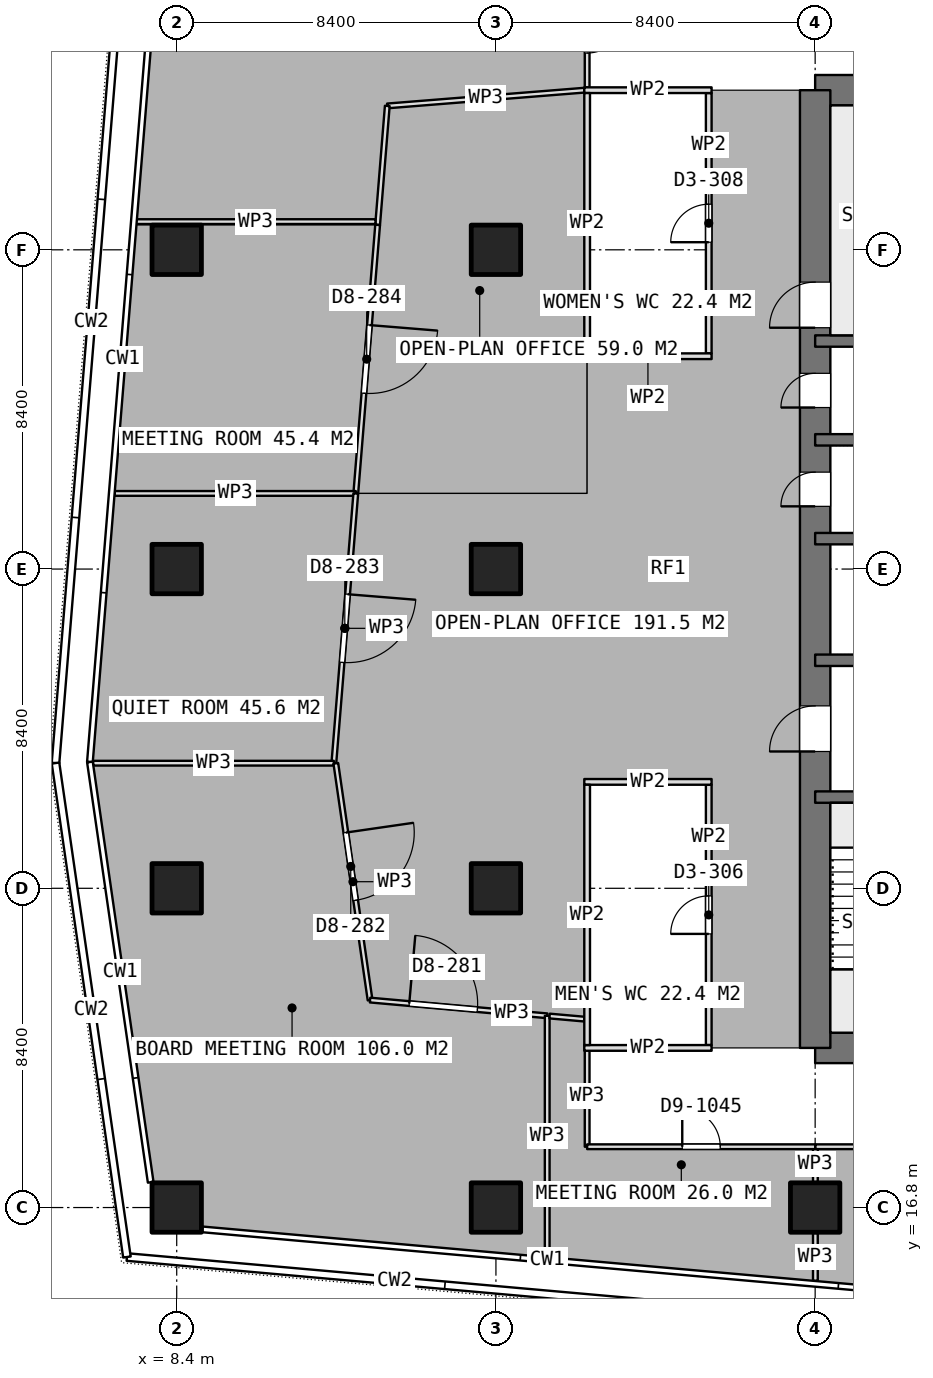
"""IFC4 building model, lengths in metres.
Left out: names, types, materials, properties, quantities, classifications, styles, units other than length and angle.
Written with IfcOpenShell. Run it as: python <this file> out.ifc"""

import sys

from ifc_helpers import new_model, si_unit, direction, frame, frame_2d, origin, origin_2d, place, context, subcontext, project, spatial, rectangle, extrude, element, fill, save


model = new_model("IFC4")
c1 = context("Model", 3, precision=1e-05, world=origin(), true_north=direction((0.0, 1.0)))
c2 = subcontext(c1, "Body", "Model", "MODEL_VIEW")
j1 = project(units=[si_unit("LENGTHUNIT", "METRE"), si_unit("PLANEANGLEUNIT", "RADIAN")], contexts=[c1])
p1 = place(None, origin())
s1 = spatial("IfcSite", under=j1, at=p1, CompositionType="ELEMENT")
p2 = place(p1, origin())
s2 = spatial("IfcBuilding", under=s1, at=p2, CompositionType="ELEMENT")
p3 = place(p2, frame((0.0, 0.0, 283.85)))
s3 = spatial("IfcBuildingStorey", under=s2, at=p3, CompositionType="ELEMENT", Elevation=283.85)
for number, where, z_axis, x_axis in (
    (1, (25.2, 21.0, 0.0), (0.0, 0.0, 1.0), (1.0, 0.0, 0.0)),
    (2, (25.2, 46.2, 0.0), (0.0, 0.0, 1.0), (1.0, 0.0, 0.0)),
):
    element("IfcWall", number, at=place(p3, frame(where, z_axis=z_axis, x_axis=x_axis)), inside=s3, PredefinedType="SHEAR", context=c2, shape_type="SweptSolid", body=[
        extrude(rectangle(XDim=10.4, YDim=0.8, at=frame_2d((5.2, 0.0))), origin(), (0.0, 0.0, 1.0), 3.75),
    ])
p4 = place(p3, frame((25.2, 21.0, 0.0), z_axis=(0.0, 0.0, 1.0), x_axis=(0.0, 1.0, 0.0)))
e3 = element("IfcWall", 3, at=p4, inside=s3, PredefinedType="SHEAR", context=c2, shape_type="SweptSolid", body=[
    extrude(rectangle(XDim=25.2, YDim=0.8, at=frame_2d((12.6, 0.0))), origin(), (0.0, 0.0, 1.0), 3.75),
])
p5 = place(p4, frame((7.8, 0.0, 0.0)))
e4 = element("IfcOpeningElement", 4, at=p5, cuts=e3, PredefinedType="OPENING", context=c2, shape_type="SweptSolid", body=[
    extrude(rectangle(XDim=1.2, YDim=2.1, at=frame_2d((0.6, 1.05))), frame((0.0, 0.41, 0.0), z_axis=(0.0, -1.0, 0.0), x_axis=(1.0, 0.0, 0.0)), (0.0, 0.0, 1.0), 0.82),
])
p6 = place(p4, frame((14.25, 0.0, 0.0)))
e5 = element("IfcOpeningElement", 5, at=p6, cuts=e3, PredefinedType="OPENING", context=c2, shape_type="SweptSolid", body=[
    extrude(rectangle(XDim=0.9, YDim=2.1, at=frame_2d((0.45, 1.05))), frame((0.0, 0.41, 0.0), z_axis=(0.0, -1.0, 0.0), x_axis=(1.0, 0.0, 0.0)), (0.0, 0.0, 1.0), 0.82),
])
p7 = place(p4, frame((16.85, 0.0, 0.0)))
e6 = element("IfcOpeningElement", 6, at=p7, cuts=e3, PredefinedType="OPENING", context=c2, shape_type="SweptSolid", body=[
    extrude(rectangle(XDim=0.9, YDim=2.1, at=frame_2d((0.45, 1.05))), frame((0.0, 0.41, 0.0), z_axis=(0.0, -1.0, 0.0), x_axis=(1.0, 0.0, 0.0)), (0.0, 0.0, 1.0), 0.82),
])
p8 = place(p4, frame((18.95, 0.0, 0.0)))
e7 = element("IfcOpeningElement", 7, at=p8, cuts=e3, PredefinedType="OPENING", context=c2, shape_type="SweptSolid", body=[
    extrude(rectangle(XDim=1.2, YDim=2.1, at=frame_2d((0.6, 1.05))), frame((0.0, 0.41, 0.0), z_axis=(0.0, -1.0, 0.0), x_axis=(1.0, 0.0, 0.0)), (0.0, 0.0, 1.0), 0.82),
])
p9 = place(p3, frame((25.2, 27.6, 0.0), z_axis=(0.0, 0.0, 1.0), x_axis=(1.0, 0.0, 0.0)))
e8 = element("IfcWall", 8, at=p9, inside=s3, PredefinedType="SHEAR", context=c2, shape_type="SweptSolid", body=[
    extrude(rectangle(XDim=6.6, YDim=0.3, at=frame_2d((3.3, 0.0))), origin(), (0.0, 0.0, 1.0), 3.75),
])
p10 = place(p9, frame((5.05, 0.0, 0.0)))
e9 = element("IfcOpeningElement", 9, at=p10, cuts=e8, PredefinedType="OPENING", context=c2, shape_type="SweptSolid", body=[
    extrude(rectangle(XDim=1.2, YDim=2.1, at=frame_2d((0.6, 1.05))), frame((0.0, 0.16, 0.0), z_axis=(0.0, -1.0, 0.0), x_axis=(1.0, 0.0, 0.0)), (0.0, 0.0, 1.0), 0.32),
])
p11 = place(p3, frame((25.2, 31.2, 0.0), z_axis=(0.0, 0.0, 1.0), x_axis=(1.0, 0.0, 0.0)))
e10 = element("IfcWall", 10, at=p11, inside=s3, PredefinedType="SHEAR", context=c2, shape_type="SweptSolid", body=[
    extrude(rectangle(XDim=6.6, YDim=0.3, at=frame_2d((3.3, 0.0))), origin(), (0.0, 0.0, 1.0), 3.75),
])
p12 = place(p11, frame((2.65, 0.0, 0.0)))
e11 = element("IfcOpeningElement", 11, at=p12, cuts=e10, PredefinedType="OPENING", context=c2, shape_type="SweptSolid", body=[
    extrude(rectangle(XDim=1.3, YDim=2.1, at=frame_2d((0.65, 1.05))), frame((0.0, 0.16, 0.0), z_axis=(0.0, -1.0, 0.0), x_axis=(1.0, 0.0, 0.0)), (0.0, 0.0, 1.0), 0.32),
])
for number, where, z_axis, x_axis in (
    (12, (25.2, 34.4, 0.0), (0.0, 0.0, 1.0), (1.0, 0.0, 0.0)),
    (13, (25.2, 37.0, 0.0), (0.0, 0.0, 1.0), (1.0, 0.0, 0.0)),
    (14, (25.2, 39.6, 0.0), (0.0, 0.0, 1.0), (1.0, 0.0, 0.0)),
):
    element("IfcWall", number, at=place(p3, frame(where, z_axis=z_axis, x_axis=x_axis)), inside=s3, PredefinedType="SHEAR", context=c2, shape_type="SweptSolid", body=[
        extrude(rectangle(XDim=6.6, YDim=0.3, at=frame_2d((3.3, 0.0))), origin(), (0.0, 0.0, 1.0), 3.75),
    ])
for number, where, z_axis, x_axis in (
    (15, (8.4, 16.8, 0.0), (0.0, 0.0, 1.0), (1.0, 0.0, 0.0)),
    (16, (8.4, 25.2, 0.0), (0.0, 0.0, 1.0), (1.0, 0.0, 0.0)),
    (17, (8.4, 33.6, 0.0), (0.0, 0.0, 1.0), (1.0, 0.0, 0.0)),
    (18, (8.4, 42.0, 0.0), (0.0, 0.0, 1.0), (1.0, 0.0, 0.0)),
    (19, (16.8, 16.8, 0.0), (0.0, 0.0, 1.0), (1.0, 0.0, 0.0)),
    (20, (16.8, 25.2, 0.0), (0.0, 0.0, 1.0), (1.0, 0.0, 0.0)),
    (21, (16.8, 33.6, 0.0), (0.0, 0.0, 1.0), (1.0, 0.0, 0.0)),
    (22, (16.8, 42.0, 0.0), (0.0, 0.0, 1.0), (1.0, 0.0, 0.0)),
    (23, (25.2, 16.8, 0.0), (0.0, 0.0, 1.0), (1.0, 0.0, 0.0)),
):
    element("IfcColumn", number, at=place(p3, frame(where, z_axis=z_axis, x_axis=x_axis)), inside=s3, PredefinedType="COLUMN", context=c2, shape_type="SweptSolid", body=[
        extrude(rectangle(XDim=1.3, YDim=1.3, at=origin_2d()), origin(), (0.0, 0.0, 1.0), 3.75),
    ])
for number, where, z_axis, x_axis in (
    (24, (19.125, 39.2, 0.0), (0.0, 0.0, 1.0), (1.0, 0.0, 0.0)),
    (25, (19.125, 46.2, 0.0), (0.0, 0.0, 1.0), (1.0, 0.0, 0.0)),
):
    element("IfcWall", number, at=place(p3, frame(where, z_axis=z_axis, x_axis=x_axis)), inside=s3, PredefinedType="PARTITIONING", context=c2, shape_type="SweptSolid", body=[
        extrude(rectangle(XDim=3.35, YDim=0.15, at=frame_2d((1.675, 0.0))), origin(), (0.0, 0.0, 1.0), 3.5),
    ])
p13 = place(p3, frame((19.2, 39.275, 0.0), z_axis=(0.0, 0.0, 1.0), x_axis=(0.0, 1.0, 0.0)))
e26 = element("IfcWall", 26, at=p13, inside=s3, PredefinedType="PARTITIONING", context=c2, shape_type="SweptSolid", body=[
    extrude(rectangle(XDim=6.85, YDim=0.15, at=frame_2d((3.425, 0.0))), origin(), (0.0, 0.0, 1.0), 3.5),
])
p14 = place(p3, frame((22.4, 39.275, 0.0), z_axis=(0.0, 0.0, 1.0), x_axis=(0.0, 1.0, 0.0)))
e27 = element("IfcWall", 27, at=p14, inside=s3, PredefinedType="PARTITIONING", context=c2, shape_type="SweptSolid", body=[
    extrude(rectangle(XDim=6.85, YDim=0.15, at=frame_2d((3.425, 0.0))), origin(), (0.0, 0.0, 1.0), 3.5),
])
p15 = place(p14, frame((2.925, 0.0, 0.0)))
e28 = element("IfcOpeningElement", 28, at=p15, cuts=e27, PredefinedType="OPENING", context=c2, shape_type="SweptSolid", body=[
    extrude(rectangle(XDim=1.0, YDim=2.1, at=frame_2d((0.5, 1.05))), frame((0.0, 0.085, 0.0), z_axis=(0.0, -1.0, 0.0), x_axis=(1.0, 0.0, 0.0)), (0.0, 0.0, 1.0), 0.17),
])
for number, where, z_axis, x_axis in (
    (29, (19.125, 21.0, 0.0), (0.0, 0.0, 1.0), (1.0, 0.0, 0.0)),
    (30, (19.125, 28.0, 0.0), (0.0, 0.0, 1.0), (1.0, 0.0, 0.0)),
):
    element("IfcWall", number, at=place(p3, frame(where, z_axis=z_axis, x_axis=x_axis)), inside=s3, PredefinedType="PARTITIONING", context=c2, shape_type="SweptSolid", body=[
        extrude(rectangle(XDim=3.35, YDim=0.15, at=frame_2d((1.675, 0.0))), origin(), (0.0, 0.0, 1.0), 3.5),
    ])
p16 = place(p3, frame((19.2, 21.075, 0.0), z_axis=(0.0, 0.0, 1.0), x_axis=(0.0, 1.0, 0.0)))
e31 = element("IfcWall", 31, at=p16, inside=s3, PredefinedType="PARTITIONING", context=c2, shape_type="SweptSolid", body=[
    extrude(rectangle(XDim=6.85, YDim=0.15, at=frame_2d((3.425, 0.0))), origin(), (0.0, 0.0, 1.0), 3.5),
])
p17 = place(p3, frame((22.4, 21.075, 0.0), z_axis=(0.0, 0.0, 1.0), x_axis=(0.0, 1.0, 0.0)))
e32 = element("IfcWall", 32, at=p17, inside=s3, PredefinedType="PARTITIONING", context=c2, shape_type="SweptSolid", body=[
    extrude(rectangle(XDim=6.85, YDim=0.15, at=frame_2d((3.425, 0.0))), origin(), (0.0, 0.0, 1.0), 3.5),
])
p18 = place(p17, frame((2.925, 0.0, 0.0)))
e33 = element("IfcOpeningElement", 33, at=p18, cuts=e32, PredefinedType="OPENING", context=c2, shape_type="SweptSolid", body=[
    extrude(rectangle(XDim=1.0, YDim=2.1, at=frame_2d((0.5, 1.05))), frame((0.0, 0.085, 0.0), z_axis=(0.0, -1.0, 0.0), x_axis=(1.0, 0.0, 0.0)), (0.0, 0.0, 1.0), 0.17),
])
p19 = place(p3, frame((19.125, 46.2, 0.0), z_axis=(0.0, 0.0, 1.0), x_axis=(-0.996825420684, -0.079618343858, 0.0)))
e34 = element("IfcWall", 34, at=p19, inside=s3, PredefinedType="PARTITIONING", context=c2, shape_type="SweptSolid", body=[
    extrude(rectangle(XDim=5.201, YDim=0.125, at=frame_2d((2.6, 0.0))), origin(), (0.0, 0.0, 1.0), 3.5),
])
p20 = place(p3, frame((13.941, 45.786, 0.0), z_axis=(0.0, 0.0, 1.0), x_axis=(-0.080882691395, -0.996723627809, 0.0)))
e35 = element("IfcWall", 35, at=p20, inside=s3, PredefinedType="PARTITIONING", context=c2, shape_type="SweptSolid", body=[
    extrude(rectangle(XDim=3.139, YDim=0.125, at=frame_2d((1.57, 0.0))), origin(), (0.0, 0.0, 1.0), 3.5),
])
p21 = place(p3, frame((13.631, 42.742, 0.0), z_axis=(0.0, 0.0, 1.0), x_axis=(-1.0, 0.0, 0.0)))
e36 = element("IfcWall", 36, at=p21, inside=s3, PredefinedType="PARTITIONING", context=c2, shape_type="SweptSolid", body=[
    extrude(rectangle(XDim=6.308, YDim=0.125, at=frame_2d((3.154, 0.0))), origin(), (0.0, 0.0, 1.0), 3.5),
])
p22 = place(p3, frame((19.2, 49.15, 0.0), z_axis=(0.0, 0.0, 1.0), x_axis=(0.0, -1.0, 0.0)))
e37 = element("IfcWall", 37, at=p22, inside=s3, PredefinedType="PARTITIONING", context=c2, shape_type="SweptSolid", body=[
    extrude(rectangle(XDim=2.875, YDim=0.125, at=frame_2d((1.438, 0.0))), origin(), (0.0, 0.0, 1.0), 3.5),
])
p23 = place(p22, frame((0.972, 0.0, 0.0)))
e38 = element("IfcOpeningElement", 38, at=p23, cuts=e37, PredefinedType="OPENING", context=c2, shape_type="SweptSolid", body=[
    extrude(rectangle(XDim=1.0, YDim=2.1, at=frame_2d((0.5, 1.05))), frame((0.0, 0.073, 0.0), z_axis=(0.0, -1.0, 0.0), x_axis=(1.0, 0.0, 0.0)), (0.0, 0.0, 1.0), 0.145),
])
p24 = place(p3, frame((13.687, 42.656, 0.0), z_axis=(0.0, 0.0, 1.0), x_axis=(-0.08110159124, -0.996705840205, 0.0)))
e39 = element("IfcWall", 39, at=p24, inside=s3, PredefinedType="PARTITIONING", context=c2, shape_type="SweptSolid", body=[
    extrude(rectangle(XDim=7.089, YDim=0.125, at=frame_2d((3.545, 0.0))), origin(), (0.0, 0.0, 1.0), 3.5),
])
p25 = place(p24, frame((2.645, 0.0, 0.0)))
e40 = element("IfcOpeningElement", 40, at=p25, cuts=e39, PredefinedType="OPENING", context=c2, shape_type="SweptSolid", body=[
    extrude(rectangle(XDim=1.8, YDim=2.1, at=frame_2d((0.9, 1.05))), frame((0.0, 0.073, 0.0), z_axis=(0.0, -1.0, 0.0), x_axis=(1.0, 0.0, 0.0)), (0.0, 0.0, 1.0), 0.145),
])
p26 = place(p3, frame((13.112, 35.59, 0.0), z_axis=(0.0, 0.0, 1.0), x_axis=(-1.0, 0.0, 0.0)))
e41 = element("IfcWall", 41, at=p26, inside=s3, PredefinedType="PARTITIONING", context=c2, shape_type="SweptSolid", body=[
    extrude(rectangle(XDim=6.341, YDim=0.125, at=frame_2d((3.17, 0.0))), origin(), (0.0, 0.0, 1.0), 3.5),
])
p27 = place(p3, frame((13.112, 35.589, 0.0), z_axis=(0.0, 0.0, 1.0), x_axis=(-0.081053384124, -0.996709761627, 0.0)))
e42 = element("IfcWall", 42, at=p27, inside=s3, PredefinedType="PARTITIONING", context=c2, shape_type="SweptSolid", body=[
    extrude(rectangle(XDim=7.121, YDim=0.125, at=frame_2d((3.56, 0.0))), origin(), (0.0, 0.0, 1.0), 3.5),
])
p28 = place(p27, frame((2.66, 0.0, 0.0)))
e43 = element("IfcOpeningElement", 43, at=p28, cuts=e42, PredefinedType="OPENING", context=c2, shape_type="SweptSolid", body=[
    extrude(rectangle(XDim=1.8, YDim=2.1, at=frame_2d((0.9, 1.05))), frame((0.0, 0.073, 0.0), z_axis=(0.0, -1.0, 0.0), x_axis=(1.0, 0.0, 0.0)), (0.0, 0.0, 1.0), 0.145),
])
p29 = place(p3, frame((12.535, 28.492, 0.0), z_axis=(0.0, 0.0, 1.0), x_axis=(-1.0, 0.0, 0.0)))
e44 = element("IfcWall", 44, at=p29, inside=s3, PredefinedType="PARTITIONING", context=c2, shape_type="SweptSolid", body=[
    extrude(rectangle(XDim=6.334, YDim=0.125, at=frame_2d((3.167, 0.0))), origin(), (0.0, 0.0, 1.0), 3.5),
])
p30 = place(p3, frame((12.587, 28.488, 0.0), z_axis=(0.0, 0.0, 1.0), x_axis=(0.143175234502, -0.989697353854, 0.0)))
e45 = element("IfcWall", 45, at=p30, inside=s3, PredefinedType="PARTITIONING", context=c2, shape_type="SweptSolid", body=[
    extrude(rectangle(XDim=6.294, YDim=0.125, at=frame_2d((3.147, 0.0))), origin(), (0.0, 0.0, 1.0), 3.5),
])
p31 = place(p30, frame((1.841, 0.0, 0.0)))
e46 = element("IfcOpeningElement", 46, at=p31, cuts=e45, PredefinedType="OPENING", context=c2, shape_type="SweptSolid", body=[
    extrude(rectangle(XDim=1.8, YDim=2.1, at=frame_2d((0.9, 1.05))), frame((0.0, 0.073, 0.0), z_axis=(0.0, -1.0, 0.0), x_axis=(1.0, 0.0, 0.0)), (0.0, 0.0, 1.0), 0.145),
])
p32 = place(p3, frame((13.488, 22.259, 0.0), z_axis=(0.0, 0.0, 1.0), x_axis=(0.996077138593, -0.088489174326, 0.0)))
e47 = element("IfcWall", 47, at=p32, inside=s3, PredefinedType="PARTITIONING", context=c2, shape_type="SweptSolid", body=[
    extrude(rectangle(XDim=4.679, YDim=0.125, at=frame_2d((2.34, 0.0))), origin(), (0.0, 0.0, 1.0), 3.5),
])
p33 = place(p32, frame((1.035, 0.0, 0.0)))
e48 = element("IfcOpeningElement", 48, at=p33, cuts=e47, PredefinedType="OPENING", context=c2, shape_type="SweptSolid", body=[
    extrude(rectangle(XDim=1.8, YDim=2.1, at=frame_2d((0.9, 1.05))), frame((0.0, 0.073, 0.0), z_axis=(0.0, -1.0, 0.0), x_axis=(1.0, 0.0, 0.0)), (0.0, 0.0, 1.0), 0.145),
])
p34 = place(p3, frame((18.149, 21.845, 0.0), z_axis=(0.0, 0.0, 1.0), x_axis=(0.0, -1.0, 0.0)))
e49 = element("IfcWall", 49, at=p34, inside=s3, PredefinedType="PARTITIONING", context=c2, shape_type="SweptSolid", body=[
    extrude(rectangle(XDim=6.345, YDim=0.125, at=frame_2d((3.172, 0.0))), origin(), (0.0, 0.0, 1.0), 3.5),
])
p35 = place(p3, frame((25.206, 18.4, 0.0), z_axis=(0.0, 0.0, 1.0), x_axis=(0.0, -1.0, 0.0)))
e50 = element("IfcWall", 50, at=p35, inside=s3, PredefinedType="PARTITIONING", context=c2, shape_type="SweptSolid", body=[
    extrude(rectangle(XDim=0.93, YDim=0.125, at=frame_2d((0.465, 0.0))), origin(), (0.0, 0.0, 1.0), 3.5),
])
p36 = place(p3, frame((25.206, 16.13, 0.0), z_axis=(0.0, 0.0, 1.0), x_axis=(0.0, -1.0, 0.0)))
e51 = element("IfcWall", 51, at=p36, inside=s3, PredefinedType="PARTITIONING", context=c2, shape_type="SweptSolid", body=[
    extrude(rectangle(XDim=1.258, YDim=0.125, at=frame_2d((0.629, 0.0))), origin(), (0.0, 0.0, 1.0), 3.5),
])
p37 = place(p3, frame((18.212, 21.839, 0.0), z_axis=(0.0, 0.0, 1.0), x_axis=(0.996083073059, -0.088422347662, 0.0)))
e52 = element("IfcWall", 52, at=p37, inside=s3, PredefinedType="PARTITIONING", context=c2, shape_type="SweptSolid", body=[
    extrude(rectangle(XDim=0.917, YDim=0.125, at=frame_2d((0.458, 0.0))), origin(), (0.0, 0.0, 1.0), 3.5),
])
p38 = place(p3, frame((19.2, 21.075, 0.0), z_axis=(0.0, 0.0, 1.0), x_axis=(0.0, -1.0, 0.0)))
e53 = element("IfcWall", 53, at=p38, inside=s3, PredefinedType="PARTITIONING", context=c2, shape_type="SweptSolid", body=[
    extrude(rectangle(XDim=2.675, YDim=0.125, at=frame_2d((1.337, 0.0))), origin(), (0.0, 0.0, 1.0), 3.5),
])
p39 = place(p3, frame((19.2, 18.4, 0.0), z_axis=(0.0, 0.0, 1.0), x_axis=(1.0, 0.0, 0.0)))
e54 = element("IfcWall", 54, at=p39, inside=s3, PredefinedType="PARTITIONING", context=c2, shape_type="SweptSolid", body=[
    extrude(rectangle(XDim=6.006, YDim=0.125, at=frame_2d((3.003, 0.0))), origin(), (0.0, 0.0, 1.0), 3.5),
])
p40 = place(p39, frame((2.503, 0.0, 0.0)))
e55 = element("IfcOpeningElement", 55, at=p40, cuts=e54, PredefinedType="OPENING", context=c2, shape_type="SweptSolid", body=[
    extrude(rectangle(XDim=1.0, YDim=2.1, at=frame_2d((0.5, 1.05))), frame((0.0, 0.073, 0.0), z_axis=(0.0, -1.0, 0.0), x_axis=(1.0, 0.0, 0.0)), (0.0, 0.0, 1.0), 0.145),
])
p41 = place(p3, frame((25.207, 18.4, 0.0), z_axis=(0.0, 0.0, 1.0), x_axis=(1.0, 0.0, 0.0)))
e56 = element("IfcWall", 56, at=p41, inside=s3, PredefinedType="PARTITIONING", context=c2, shape_type="SweptSolid", body=[
    extrude(rectangle(XDim=9.297, YDim=0.125, at=frame_2d((4.648, 0.0))), origin(), (0.0, 0.0, 1.0), 3.5),
])
p42 = place(p41, frame((4.148, 0.0, 0.0)))
e57 = element("IfcOpeningElement", 57, at=p42, cuts=e56, PredefinedType="OPENING", context=c2, shape_type="SweptSolid", body=[
    extrude(rectangle(XDim=1.0, YDim=2.1, at=frame_2d((0.5, 1.05))), frame((0.0, 0.073, 0.0), z_axis=(0.0, -1.0, 0.0), x_axis=(1.0, 0.0, 0.0)), (0.0, 0.0, 1.0), 0.145),
])
p43 = place(p5, origin())
e58 = element("IfcDoor", 58, at=p43, inside=s3, OperationType="SINGLE_SWING_LEFT", PredefinedType="DOOR", context=c2, shape_type="SweptSolid", body=[
    extrude(rectangle(XDim=1.2, YDim=2.1, at=frame_2d((0.6, 1.05))), frame((0.0, 0.025, 0.0), z_axis=(0.0, -1.0, 0.0), x_axis=(1.0, 0.0, 0.0)), (0.0, 0.0, 1.0), 0.05),
])
fill(e4, e58)
p44 = place(p6, origin())
e59 = element("IfcDoor", 59, at=p44, inside=s3, OperationType="SINGLE_SWING_LEFT", PredefinedType="DOOR", context=c2, shape_type="SweptSolid", body=[
    extrude(rectangle(XDim=0.9, YDim=2.1, at=frame_2d((0.45, 1.05))), frame((0.0, 0.025, 0.0), z_axis=(0.0, -1.0, 0.0), x_axis=(1.0, 0.0, 0.0)), (0.0, 0.0, 1.0), 0.05),
])
fill(e5, e59)
p45 = place(p7, origin())
e60 = element("IfcDoor", 60, at=p45, inside=s3, OperationType="SINGLE_SWING_LEFT", PredefinedType="DOOR", context=c2, shape_type="SweptSolid", body=[
    extrude(rectangle(XDim=0.9, YDim=2.1, at=frame_2d((0.45, 1.05))), frame((0.0, 0.025, 0.0), z_axis=(0.0, -1.0, 0.0), x_axis=(1.0, 0.0, 0.0)), (0.0, 0.0, 1.0), 0.05),
])
fill(e6, e60)
p46 = place(p15, origin())
e61 = element("IfcDoor", 61, at=p46, inside=s3, OperationType="SINGLE_SWING_LEFT", PredefinedType="DOOR", context=c2, shape_type="SweptSolid", body=[
    extrude(rectangle(XDim=1.0, YDim=2.1, at=frame_2d((0.5, 1.05))), frame((0.0, 0.025, 0.0), z_axis=(0.0, -1.0, 0.0), x_axis=(1.0, 0.0, 0.0)), (0.0, 0.0, 1.0), 0.05),
])
fill(e28, e61)
p47 = place(p18, origin())
e62 = element("IfcDoor", 62, at=p47, inside=s3, OperationType="SINGLE_SWING_LEFT", PredefinedType="DOOR", context=c2, shape_type="SweptSolid", body=[
    extrude(rectangle(XDim=1.0, YDim=2.1, at=frame_2d((0.5, 1.05))), frame((0.0, 0.025, 0.0), z_axis=(0.0, -1.0, 0.0), x_axis=(1.0, 0.0, 0.0)), (0.0, 0.0, 1.0), 0.05),
])
fill(e33, e62)
p48 = place(p23, origin())
e63 = element("IfcDoor", 63, at=p48, inside=s3, OperationType="SINGLE_SWING_LEFT", PredefinedType="DOOR", context=c2, shape_type="SweptSolid", body=[
    extrude(rectangle(XDim=1.0, YDim=2.1, at=frame_2d((0.5, 1.05))), frame((0.0, 0.025, 0.0), z_axis=(0.0, -1.0, 0.0), x_axis=(1.0, 0.0, 0.0)), (0.0, 0.0, 1.0), 0.05),
])
fill(e38, e63)
p49 = place(p25, origin())
e64 = element("IfcDoor", 64, at=p49, inside=s3, OperationType="DOUBLE_DOOR_SINGLE_SWING", PredefinedType="DOOR", context=c2, shape_type="SweptSolid", body=[
    extrude(rectangle(XDim=1.8, YDim=2.1, at=frame_2d((0.9, 1.05))), frame((0.0, 0.025, 0.0), z_axis=(0.0, -1.0, 0.0), x_axis=(1.0, 0.0, 0.0)), (0.0, 0.0, 1.0), 0.05),
])
fill(e40, e64)
p50 = place(p28, origin())
e65 = element("IfcDoor", 65, at=p50, inside=s3, OperationType="DOUBLE_DOOR_SINGLE_SWING", PredefinedType="DOOR", context=c2, shape_type="SweptSolid", body=[
    extrude(rectangle(XDim=1.8, YDim=2.1, at=frame_2d((0.9, 1.05))), frame((0.0, 0.025, 0.0), z_axis=(0.0, -1.0, 0.0), x_axis=(1.0, 0.0, 0.0)), (0.0, 0.0, 1.0), 0.05),
])
fill(e43, e65)
p51 = place(p31, origin())
e66 = element("IfcDoor", 66, at=p51, inside=s3, OperationType="DOUBLE_DOOR_SINGLE_SWING", PredefinedType="DOOR", context=c2, shape_type="SweptSolid", body=[
    extrude(rectangle(XDim=1.8, YDim=2.1, at=frame_2d((0.9, 1.05))), frame((0.0, 0.025, 0.0), z_axis=(0.0, -1.0, 0.0), x_axis=(1.0, 0.0, 0.0)), (0.0, 0.0, 1.0), 0.05),
])
fill(e46, e66)
p52 = place(p33, origin())
e67 = element("IfcDoor", 67, at=p52, inside=s3, OperationType="DOUBLE_DOOR_SINGLE_SWING", PredefinedType="DOOR", context=c2, shape_type="SweptSolid", body=[
    extrude(rectangle(XDim=1.8, YDim=2.1, at=frame_2d((0.9, 1.05))), frame((0.0, 0.025, 0.0), z_axis=(0.0, -1.0, 0.0), x_axis=(1.0, 0.0, 0.0)), (0.0, 0.0, 1.0), 0.05),
])
fill(e48, e67)
p53 = place(p40, origin())
e68 = element("IfcDoor", 68, at=p53, inside=s3, OperationType="SINGLE_SWING_LEFT", PredefinedType="DOOR", context=c2, shape_type="SweptSolid", body=[
    extrude(rectangle(XDim=1.0, YDim=2.1, at=frame_2d((0.5, 1.05))), frame((0.0, 0.025, 0.0), z_axis=(0.0, -1.0, 0.0), x_axis=(1.0, 0.0, 0.0)), (0.0, 0.0, 1.0), 0.05),
])
fill(e55, e68)
p54 = place(p8, origin())
e69 = element("IfcDoor", 69, at=p54, inside=s3, OperationType="SINGLE_SWING_RIGHT", PredefinedType="DOOR", context=c2, shape_type="SweptSolid", body=[
    extrude(rectangle(XDim=1.2, YDim=2.1, at=frame_2d((0.6, 1.05))), frame((0.0, 0.025, 0.0), z_axis=(0.0, -1.0, 0.0), x_axis=(1.0, 0.0, 0.0)), (0.0, 0.0, 1.0), 0.05),
])
fill(e7, e69)
save(model, sys.argv[1])
